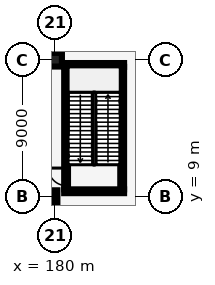
"""IFC4 building model, lengths in metres.
Left out: names, types, materials, properties, quantities, classifications, styles, units other than length and angle.
Written with IfcOpenShell. Run it as: python <this file> out.ifc"""

import sys

from ifc_helpers import new_model, si_unit, direction, frame, frame_2d, origin, origin_2d, place, context, subcontext, project, spatial, rectangle, i_section, extrude, element, fill, save


model = new_model("IFC4")
c1 = context("Model", 3, precision=1e-05, world=origin(), true_north=direction((0.0, 1.0)))
c2 = subcontext(c1, "Body", "Model", "MODEL_VIEW")
j1 = project(units=[si_unit("LENGTHUNIT", "METRE"), si_unit("PLANEANGLEUNIT", "RADIAN")], contexts=[c1])
p1 = place(None, origin())
s1 = spatial("IfcSite", under=j1, at=p1, CompositionType="ELEMENT")
p2 = place(p1, origin())
s2 = spatial("IfcBuilding", under=s1, at=p2, CompositionType="ELEMENT")
p3 = place(p2, origin())
s3 = spatial("IfcBuildingStorey", under=s2, at=p3, CompositionType="ELEMENT", Elevation=0.0)
p4 = place(p3, frame((180.0, 9.0, 0.0), z_axis=(0.0, 0.0, 1.0), x_axis=(1.0, 0.0, 0.0)))
e1 = element("IfcColumn", 1, at=p4, inside=s3, PredefinedType="COLUMN", context=c2, shape_type="SweptSolid", body=[
    extrude(i_section(OverallWidth=0.303, OverallDepth=0.814, WebThickness=0.021, FlangeThickness=0.04, FilletRadius=0.03, at=origin_2d()), origin(), (0.0, 0.0, 1.0), 6.0),
])
p5 = place(p3, frame((180.0, 18.0, 0.0), z_axis=(0.0, 0.0, 1.0), x_axis=(1.0, 0.0, 0.0)))
e2 = element("IfcColumn", 2, at=p5, inside=s3, PredefinedType="COLUMN", context=c2, shape_type="SweptSolid", body=[
    extrude(rectangle(XDim=0.9, YDim=0.9, at=origin_2d()), origin(), (0.0, 0.0, 1.0), 6.0),
])
p6 = place(p3, frame((180.725, 9.47, 0.0), z_axis=(0.0, 0.0, 1.0), x_axis=(0.0, 1.0, 0.0)))
e3 = element("IfcWall", 3, at=p6, inside=s3, PredefinedType="SHEAR", context=c2, shape_type="SweptSolid", body=[
    extrude(rectangle(XDim=8.06, YDim=0.25, at=frame_2d((4.03, 0.0))), origin(), (0.0, 0.0, 1.0), 5.64),
])
p7 = place(p6, frame((0.25, 0.0, 0.0)))
e4 = element("IfcOpeningElement", 4, at=p7, cuts=e3, PredefinedType="OPENING", context=c2, shape_type="SweptSolid", body=[
    extrude(rectangle(XDim=1.15, YDim=2.15, at=frame_2d((0.575, 1.075))), frame((0.0, 0.135, 0.0), z_axis=(0.0, -1.0, 0.0), x_axis=(1.0, 0.0, 0.0)), (0.0, 0.0, 1.0), 0.27),
])
p8 = place(p3, frame((184.415, 9.47, 0.0), z_axis=(0.0, 0.0, 1.0), x_axis=(0.0, 1.0, 0.0)))
e5 = element("IfcWall", 5, at=p8, inside=s3, PredefinedType="SHEAR", context=c2, shape_type="SweptSolid", body=[
    extrude(rectangle(XDim=8.06, YDim=0.25, at=frame_2d((4.03, 0.0))), origin(), (0.0, 0.0, 1.0), 5.64),
])
for number, where, z_axis, x_axis in (
    (6, (180.6, 9.345, 0.0), (0.0, 0.0, 1.0), (1.0, 0.0, 0.0)),
    (7, (180.6, 17.655, 0.0), (0.0, 0.0, 1.0), (1.0, 0.0, 0.0)),
):
    element("IfcWall", number, at=place(p3, frame(where, z_axis=z_axis, x_axis=x_axis)), inside=s3, PredefinedType="SHEAR", context=c2, shape_type="SweptSolid", body=[
        extrude(rectangle(XDim=3.94, YDim=0.25, at=frame_2d((1.97, 0.0))), origin(), (0.0, 0.0, 1.0), 5.64),
    ])
p9 = place(p7, origin())
e8 = element("IfcDoor", 8, at=p9, inside=s3, OperationType="SINGLE_SWING_RIGHT", PredefinedType="DOOR", context=c2, shape_type="SweptSolid", body=[
    extrude(rectangle(XDim=1.15, YDim=2.15, at=frame_2d((0.575, 1.075))), frame((0.0, 0.025, 0.0), z_axis=(0.0, -1.0, 0.0), x_axis=(1.0, 0.0, 0.0)), (0.0, 0.0, 1.0), 0.05),
])
fill(e4, e8)
save(model, sys.argv[1])
